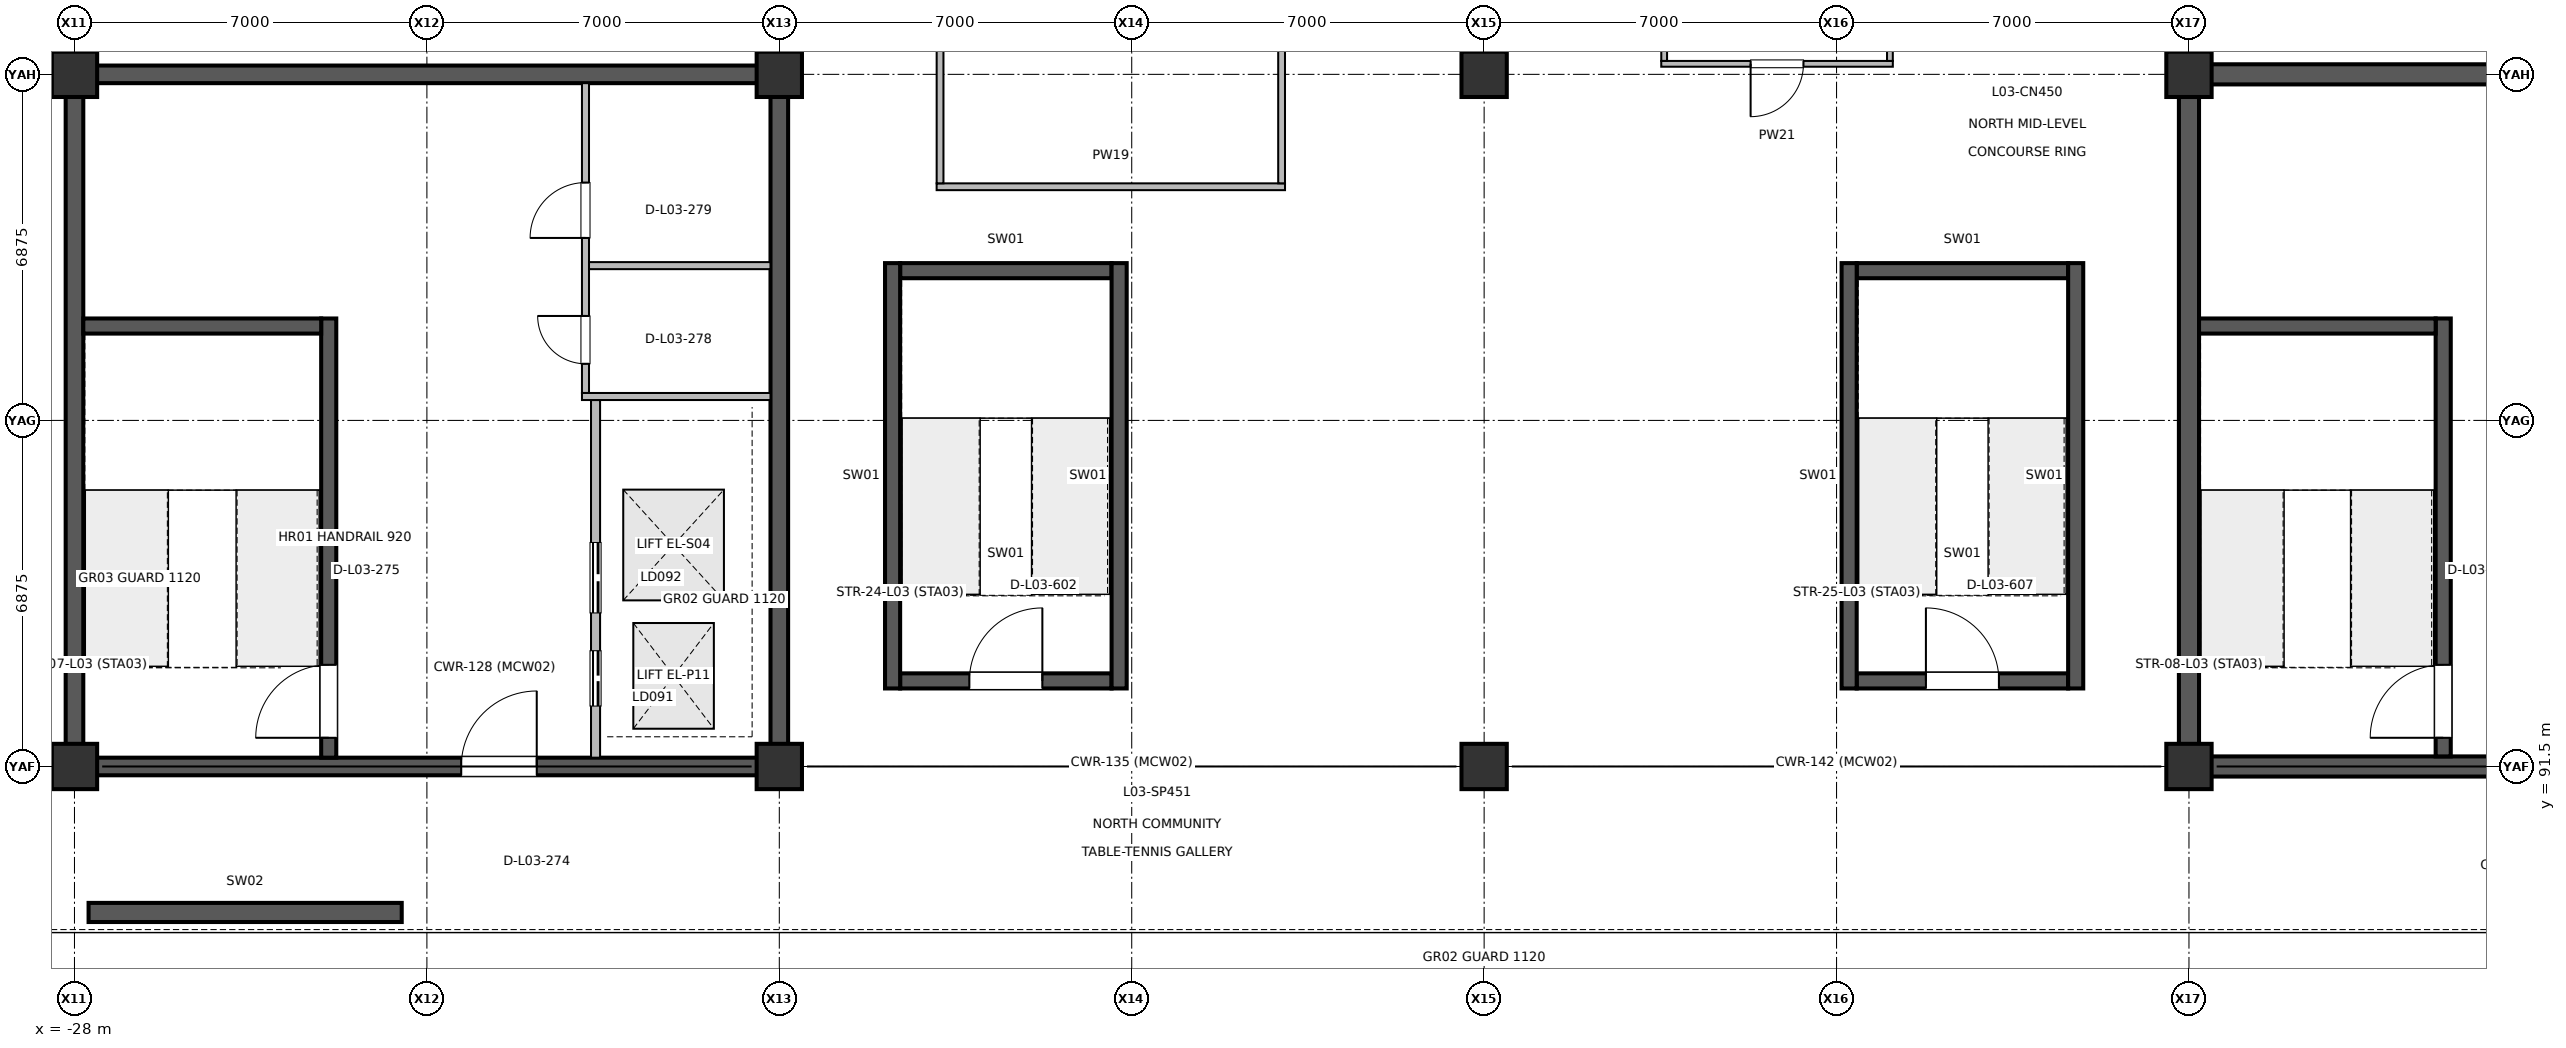
"""IFC4 building model, lengths in metres.
Left out: names, types, materials, properties, quantities, classifications, styles, units other than length and angle.
Written with IfcOpenShell. Run it as: python <this file> out.ifc"""

import sys

from ifc_helpers import new_model, si_unit, direction, frame, frame_2d, origin, origin_2d, place, context, subcontext, project, spatial, rectangle, circle, extrude, element, fill, save


model = new_model("IFC4")
c1 = context("Model", 3, precision=1e-05, world=origin(), true_north=direction((0.0, 1.0)))
c2 = subcontext(c1, "Body", "Model", "MODEL_VIEW")
j1 = project(units=[si_unit("LENGTHUNIT", "METRE"), si_unit("PLANEANGLEUNIT", "RADIAN")], contexts=[c1])
p1 = place(None, origin())
s1 = spatial("IfcSite", under=j1, at=p1, CompositionType="ELEMENT")
p2 = place(p1, origin())
s2 = spatial("IfcBuilding", under=s1, at=p2, CompositionType="ELEMENT")
p3 = place(p2, frame((0.0, 0.0, 11.4)))
s3 = spatial("IfcBuildingStorey", under=s2, at=p3, CompositionType="ELEMENT", Elevation=11.4)
for number, where, z_axis, x_axis in (
    (1, (-28.0, 91.5, 0.0), (0.0, 0.0, 1.0), (1.0, 0.0, 0.0)),
    (2, (-28.0, 105.25, 0.0), (0.0, 0.0, 1.0), (1.0, 0.0, 0.0)),
    (3, (-14.0, 91.5, 0.0), (0.0, 0.0, 1.0), (1.0, 0.0, 0.0)),
    (4, (-14.0, 105.25, 0.0), (0.0, 0.0, 1.0), (1.0, 0.0, 0.0)),
    (5, (0.0, 91.5, 0.0), (0.0, 0.0, 1.0), (1.0, 0.0, 0.0)),
    (6, (0.0, 105.25, 0.0), (0.0, 0.0, 1.0), (1.0, 0.0, 0.0)),
    (7, (14.0, 91.5, 0.0), (0.0, 0.0, 1.0), (1.0, 0.0, 0.0)),
    (8, (14.0, 105.25, 0.0), (0.0, 0.0, 1.0), (1.0, 0.0, 0.0)),
):
    element("IfcColumn", number, at=place(p3, frame(where, z_axis=z_axis, x_axis=x_axis)), inside=s3, PredefinedType="COLUMN", context=c2, shape_type="SweptSolid", body=[
        extrude(circle(Radius=0.45, at=origin_2d()), origin(), (0.0, 0.0, 1.0), 4.798),
    ])
for number, where, z_axis, x_axis in (
    (9, (-28.0, 91.675, 0.0), (0.0, 0.0, 1.0), (0.0, 1.0, 0.0)),
    (10, (-14.0, 91.675, 0.0), (0.0, 0.0, 1.0), (0.0, 1.0, 0.0)),
):
    element("IfcWall", number, at=place(p3, frame(where, z_axis=z_axis, x_axis=x_axis)), inside=s3, PredefinedType="SHEAR", context=c2, shape_type="SweptSolid", body=[
        extrude(rectangle(XDim=13.4, YDim=0.35, at=frame_2d((6.7, 0.0))), origin(), (0.0, 0.0, 1.0), 4.6),
    ])
p4 = place(p3, frame((-27.825, 91.5, 0.0), z_axis=(0.0, 0.0, 1.0), x_axis=(1.0, 0.0, 0.0)))
e11 = element("IfcWall", 11, at=p4, inside=s3, PredefinedType="SHEAR", context=c2, shape_type="SweptSolid", body=[
    extrude(rectangle(XDim=13.65, YDim=0.35, at=frame_2d((6.825, 0.0))), origin(), (0.0, 0.0, 1.0), 4.6),
])
p5 = place(p4, frame((7.507, 0.0, 0.0)))
e12 = element("IfcOpeningElement", 12, at=p5, cuts=e11, PredefinedType="OPENING", context=c2, shape_type="SweptSolid", body=[
    extrude(rectangle(XDim=1.5, YDim=2.2, at=frame_2d((0.75, 1.1))), frame((0.0, 0.185, 0.0), z_axis=(0.0, -1.0, 0.0), x_axis=(1.0, 0.0, 0.0)), (0.0, 0.0, 1.0), 0.37),
])
p6 = place(p3, frame((-27.825, 105.25, 0.0), z_axis=(0.0, 0.0, 1.0), x_axis=(1.0, 0.0, 0.0)))
e13 = element("IfcWall", 13, at=p6, inside=s3, PredefinedType="SHEAR", context=c2, shape_type="SweptSolid", body=[
    extrude(rectangle(XDim=13.65, YDim=0.35, at=frame_2d((6.825, 0.0))), origin(), (0.0, 0.0, 1.0), 4.6),
])
p7 = place(p3, frame((14.0, 91.7, 0.0), z_axis=(0.0, 0.0, 1.0), x_axis=(0.0, 1.0, 0.0)))
e14 = element("IfcWall", 14, at=p7, inside=s3, PredefinedType="SHEAR", context=c2, shape_type="SweptSolid", body=[
    extrude(rectangle(XDim=13.35, YDim=0.4, at=frame_2d((6.675, 0.0))), origin(), (0.0, 0.0, 1.0), 4.6),
])
p8 = place(p3, frame((14.2, 91.5, 0.0), z_axis=(0.0, 0.0, 1.0), x_axis=(1.0, 0.0, 0.0)))
e15 = element("IfcWall", 15, at=p8, inside=s3, PredefinedType="SHEAR", context=c2, shape_type="SweptSolid", body=[
    extrude(rectangle(XDim=13.6, YDim=0.4, at=frame_2d((6.8, 0.0))), origin(), (0.0, 0.0, 1.0), 4.6),
])
p9 = place(p8, frame((7.48, 0.0, 0.0)))
e16 = element("IfcOpeningElement", 16, at=p9, cuts=e15, PredefinedType="OPENING", context=c2, shape_type="SweptSolid", body=[
    extrude(rectangle(XDim=1.5, YDim=2.2, at=frame_2d((0.75, 1.1))), frame((0.0, 0.21, 0.0), z_axis=(0.0, -1.0, 0.0), x_axis=(1.0, 0.0, 0.0)), (0.0, 0.0, 1.0), 0.42),
])
p10 = place(p3, frame((14.2, 105.25, 0.0), z_axis=(0.0, 0.0, 1.0), x_axis=(1.0, 0.0, 0.0)))
e17 = element("IfcWall", 17, at=p10, inside=s3, PredefinedType="SHEAR", context=c2, shape_type="SweptSolid", body=[
    extrude(rectangle(XDim=13.6, YDim=0.4, at=frame_2d((6.8, 0.0))), origin(), (0.0, 0.0, 1.0), 4.6),
])
p11 = place(p3, frame((-27.72, 88.6, 0.0), z_axis=(0.0, 0.0, 1.0), x_axis=(1.0, 0.0, 0.0)))
e18 = element("IfcWall", 18, at=p11, inside=s3, PredefinedType="SHEAR", context=c2, shape_type="SweptSolid", body=[
    extrude(rectangle(XDim=6.22, YDim=0.38, at=frame_2d((3.11, 0.0))), origin(), (0.0, 0.0, 1.0), 4.6),
])
p12 = place(p3, frame((-22.95, 91.675, 0.0), z_axis=(0.0, 0.0, 1.0), x_axis=(0.0, 1.0, 0.0)))
e19 = element("IfcWall", 19, at=p12, inside=s3, PredefinedType="SHEAR", context=c2, shape_type="SweptSolid", body=[
    extrude(rectangle(XDim=8.725, YDim=0.3, at=frame_2d((4.362, 0.0))), origin(), (0.0, 0.0, 1.0), 4.6),
])
p13 = place(p12, frame((0.395, 0.0, 0.0)))
e20 = element("IfcOpeningElement", 20, at=p13, cuts=e19, PredefinedType="OPENING", context=c2, shape_type="SweptSolid", body=[
    extrude(rectangle(XDim=1.45, YDim=2.2, at=frame_2d((0.725, 1.1))), frame((0.0, 0.16, 0.0), z_axis=(0.0, -1.0, 0.0), x_axis=(1.0, 0.0, 0.0)), (0.0, 0.0, 1.0), 0.32),
])
p14 = place(p3, frame((-17.65, 91.675, 0.0), z_axis=(0.0, 0.0, 1.0), x_axis=(0.0, 1.0, 0.0)))
e21 = element("IfcWall", 21, at=p14, inside=s3, PredefinedType="PARTITIONING", context=c2, shape_type="SweptSolid", body=[
    extrude(rectangle(XDim=7.105, YDim=0.18, at=frame_2d((3.552, 0.0))), origin(), (0.0, 0.0, 1.0), 3.82),
])
p15 = place(p14, frame((1.025, 0.0, 0.0)))
e22 = element("IfcOpeningElement", 22, at=p15, cuts=e21, PredefinedType="OPENING", context=c2, shape_type="SweptSolid", body=[
    extrude(rectangle(XDim=1.1, YDim=2.2, at=frame_2d((0.55, 1.1))), frame((0.0, 0.1, 0.0), z_axis=(0.0, -1.0, 0.0), x_axis=(1.0, 0.0, 0.0)), (0.0, 0.0, 1.0), 0.2),
])
p16 = place(p14, frame((2.875, 0.0, 0.0)))
e23 = element("IfcOpeningElement", 23, at=p16, cuts=e21, PredefinedType="OPENING", context=c2, shape_type="SweptSolid", body=[
    extrude(rectangle(XDim=1.4, YDim=2.3, at=frame_2d((0.7, 1.15))), frame((0.0, 0.1, 0.0), z_axis=(0.0, -1.0, 0.0), x_axis=(1.0, 0.0, 0.0)), (0.0, 0.0, 1.0), 0.2),
])
p17 = place(p3, frame((-17.85, 98.92, 0.0), z_axis=(0.0, 0.0, 1.0), x_axis=(0.0, 1.0, 0.0)))
e24 = element("IfcWall", 24, at=p17, inside=s3, PredefinedType="PARTITIONING", context=c2, shape_type="SweptSolid", body=[
    extrude(rectangle(XDim=6.155, YDim=0.14, at=frame_2d((3.078, 0.0))), origin(), (0.0, 0.0, 1.0), 3.82),
])
p18 = place(p17, frame((0.58, 0.0, 0.0)))
e25 = element("IfcOpeningElement", 25, at=p18, cuts=e24, PredefinedType="OPENING", context=c2, shape_type="SweptSolid", body=[
    extrude(rectangle(XDim=0.95, YDim=2.15, at=frame_2d((0.475, 1.075))), frame((0.0, 0.08, 0.0), z_axis=(0.0, -1.0, 0.0), x_axis=(1.0, 0.0, 0.0)), (0.0, 0.0, 1.0), 0.16),
])
p19 = place(p17, frame((3.08, 0.0, 0.0)))
e26 = element("IfcOpeningElement", 26, at=p19, cuts=e24, PredefinedType="OPENING", context=c2, shape_type="SweptSolid", body=[
    extrude(rectangle(XDim=1.1, YDim=2.15, at=frame_2d((0.55, 1.075))), frame((0.0, 0.08, 0.0), z_axis=(0.0, -1.0, 0.0), x_axis=(1.0, 0.0, 0.0)), (0.0, 0.0, 1.0), 0.16),
])
p20 = place(p3, frame((19.05, 91.7, 0.0), z_axis=(0.0, 0.0, 1.0), x_axis=(0.0, 1.0, 0.0)))
e27 = element("IfcWall", 27, at=p20, inside=s3, PredefinedType="SHEAR", context=c2, shape_type="SweptSolid", body=[
    extrude(rectangle(XDim=8.7, YDim=0.3, at=frame_2d((4.35, 0.0))), origin(), (0.0, 0.0, 1.0), 4.6),
])
p21 = place(p20, frame((0.37, 0.0, 0.0)))
e28 = element("IfcOpeningElement", 28, at=p21, cuts=e27, PredefinedType="OPENING", context=c2, shape_type="SweptSolid", body=[
    extrude(rectangle(XDim=1.45, YDim=2.2, at=frame_2d((0.725, 1.1))), frame((0.0, 0.16, 0.0), z_axis=(0.0, -1.0, 0.0), x_axis=(1.0, 0.0, 0.0)), (0.0, 0.0, 1.0), 0.32),
])
p22 = place(p3, frame((8.118, 105.459, 0.0), z_axis=(0.0, 0.0, 1.0), x_axis=(-1.0, 0.0, 0.0)))
e29 = element("IfcWall", 29, at=p22, inside=s3, PredefinedType="PARTITIONING", context=c2, shape_type="SweptSolid", body=[
    extrude(rectangle(XDim=4.6, YDim=0.115, at=frame_2d((2.3, 0.0))), origin(), (0.0, 0.0, 1.0), 3.475),
])
p23 = place(p22, frame((1.775, 0.0, 0.0)))
e30 = element("IfcOpeningElement", 30, at=p23, cuts=e29, PredefinedType="OPENING", context=c2, shape_type="SweptSolid", body=[
    extrude(rectangle(XDim=1.05, YDim=2.25, at=frame_2d((0.525, 1.125))), frame((0.0, 0.067, 0.0), z_axis=(0.0, -1.0, 0.0), x_axis=(1.0, 0.0, 0.0)), (0.0, 0.0, 1.0), 0.135),
])
p24 = place(p3, frame((-17.92, 98.85, 0.0), z_axis=(0.0, 0.0, 1.0), x_axis=(1.0, 0.0, 0.0)))
e31 = element("IfcWall", 31, at=p24, inside=s3, PredefinedType="PARTITIONING", context=c2, shape_type="SweptSolid", body=[
    extrude(rectangle(XDim=3.745, YDim=0.14, at=frame_2d((1.873, 0.0))), origin(), (0.0, 0.0, 1.0), 3.82),
])
p25 = place(p3, frame((-17.78, 101.45, 0.0), z_axis=(0.0, 0.0, 1.0), x_axis=(1.0, 0.0, 0.0)))
e32 = element("IfcWall", 32, at=p25, inside=s3, PredefinedType="PARTITIONING", context=c2, shape_type="SweptSolid", body=[
    extrude(rectangle(XDim=3.605, YDim=0.14, at=frame_2d((1.802, 0.0))), origin(), (0.0, 0.0, 1.0), 3.82),
])
p26 = place(p3, frame((-10.875, 103.017, 0.0), z_axis=(0.0, 0.0, 1.0), x_axis=(1.0, 0.0, 0.0)))
e33 = element("IfcWall", 33, at=p26, inside=s3, PredefinedType="PARTITIONING", context=c2, shape_type="SweptSolid", body=[
    extrude(rectangle(XDim=6.92, YDim=0.135, at=frame_2d((3.46, 0.0))), origin(), (0.0, 0.0, 1.0), 3.82),
])
for number, where, z_axis, x_axis in (
    (34, (-10.807, 103.085, 0.0), (0.0, 0.0, 1.0), (0.0, 1.0, 0.0)),
    (35, (-4.023, 103.085, 0.0), (0.0, 0.0, 1.0), (0.0, 1.0, 0.0)),
):
    element("IfcWall", number, at=place(p3, frame(where, z_axis=z_axis, x_axis=x_axis)), inside=s3, PredefinedType="PARTITIONING", context=c2, shape_type="SweptSolid", body=[
        extrude(rectangle(XDim=3.064, YDim=0.135, at=frame_2d((1.532, 0.0))), origin(), (0.0, 0.0, 1.0), 3.475),
    ])
for number, where, z_axis, x_axis in (
    (36, (3.576, 105.517, 0.0), (0.0, 0.0, 1.0), (0.0, 1.0, 0.0)),
    (37, (8.06, 105.517, 0.0), (0.0, 0.0, 1.0), (0.0, 1.0, 0.0)),
):
    element("IfcWall", number, at=place(p3, frame(where, z_axis=z_axis, x_axis=x_axis)), inside=s3, PredefinedType="PARTITIONING", context=c2, shape_type="SweptSolid", body=[
        extrude(rectangle(XDim=2.244, YDim=0.115, at=frame_2d((1.122, 0.0))), origin(), (0.0, 0.0, 1.0), 3.475),
    ])
p27 = place(p3, frame((-27.825, 100.25, 0.0), z_axis=(0.0, 0.0, 1.0), x_axis=(1.0, 0.0, 0.0)))
e38 = element("IfcWall", 38, at=p27, inside=s3, PredefinedType="SHEAR", context=c2, shape_type="SweptSolid", body=[
    extrude(rectangle(XDim=4.725, YDim=0.3, at=frame_2d((2.362, 0.0))), origin(), (0.0, 0.0, 1.0), 4.6),
])
p28 = place(p3, frame((14.2, 100.25, 0.0), z_axis=(0.0, 0.0, 1.0), x_axis=(1.0, 0.0, 0.0)))
e39 = element("IfcWall", 39, at=p28, inside=s3, PredefinedType="SHEAR", context=c2, shape_type="SweptSolid", body=[
    extrude(rectangle(XDim=4.7, YDim=0.3, at=frame_2d((2.35, 0.0))), origin(), (0.0, 0.0, 1.0), 4.6),
])
p29 = place(p3, frame((-11.6, 93.2, 0.0), z_axis=(0.0, 0.0, 1.0), x_axis=(1.0, 0.0, 0.0)))
e40 = element("IfcWall", 40, at=p29, inside=s3, PredefinedType="SHEAR", context=c2, shape_type="SweptSolid", body=[
    extrude(rectangle(XDim=4.2, YDim=0.3, at=frame_2d((2.1, 0.0))), origin(), (0.0, 0.0, 1.0), 4.6),
])
p30 = place(p29, frame((1.375, 0.0, 0.0)))
e41 = element("IfcOpeningElement", 41, at=p30, cuts=e40, PredefinedType="OPENING", context=c2, shape_type="SweptSolid", body=[
    extrude(rectangle(XDim=1.45, YDim=2.2, at=frame_2d((0.725, 1.1))), frame((0.0, 0.16, 0.0), z_axis=(0.0, -1.0, 0.0), x_axis=(1.0, 0.0, 0.0)), (0.0, 0.0, 1.0), 0.32),
])
p31 = place(p3, frame((-11.6, 101.35, 0.0), z_axis=(0.0, 0.0, 1.0), x_axis=(1.0, 0.0, 0.0)))
e42 = element("IfcWall", 42, at=p31, inside=s3, PredefinedType="SHEAR", context=c2, shape_type="SweptSolid", body=[
    extrude(rectangle(XDim=4.2, YDim=0.3, at=frame_2d((2.1, 0.0))), origin(), (0.0, 0.0, 1.0), 4.6),
])
for number, where, z_axis, x_axis in (
    (43, (-11.75, 93.05, 0.0), (0.0, 0.0, 1.0), (0.0, 1.0, 0.0)),
    (44, (-7.25, 93.05, 0.0), (0.0, 0.0, 1.0), (0.0, 1.0, 0.0)),
):
    element("IfcWall", number, at=place(p3, frame(where, z_axis=z_axis, x_axis=x_axis)), inside=s3, PredefinedType="SHEAR", context=c2, shape_type="SweptSolid", body=[
        extrude(rectangle(XDim=8.45, YDim=0.3, at=frame_2d((4.225, 0.0))), origin(), (0.0, 0.0, 1.0), 4.6),
    ])
p32 = place(p3, frame((7.4, 93.2, 0.0), z_axis=(0.0, 0.0, 1.0), x_axis=(1.0, 0.0, 0.0)))
e45 = element("IfcWall", 45, at=p32, inside=s3, PredefinedType="SHEAR", context=c2, shape_type="SweptSolid", body=[
    extrude(rectangle(XDim=4.2, YDim=0.3, at=frame_2d((2.1, 0.0))), origin(), (0.0, 0.0, 1.0), 4.6),
])
p33 = place(p32, frame((1.375, 0.0, 0.0)))
e46 = element("IfcOpeningElement", 46, at=p33, cuts=e45, PredefinedType="OPENING", context=c2, shape_type="SweptSolid", body=[
    extrude(rectangle(XDim=1.45, YDim=2.2, at=frame_2d((0.725, 1.1))), frame((0.0, 0.16, 0.0), z_axis=(0.0, -1.0, 0.0), x_axis=(1.0, 0.0, 0.0)), (0.0, 0.0, 1.0), 0.32),
])
p34 = place(p3, frame((7.4, 101.35, 0.0), z_axis=(0.0, 0.0, 1.0), x_axis=(1.0, 0.0, 0.0)))
e47 = element("IfcWall", 47, at=p34, inside=s3, PredefinedType="SHEAR", context=c2, shape_type="SweptSolid", body=[
    extrude(rectangle(XDim=4.2, YDim=0.3, at=frame_2d((2.1, 0.0))), origin(), (0.0, 0.0, 1.0), 4.6),
])
for number, where, z_axis, x_axis in (
    (48, (7.25, 93.05, 0.0), (0.0, 0.0, 1.0), (0.0, 1.0, 0.0)),
    (49, (11.75, 93.05, 0.0), (0.0, 0.0, 1.0), (0.0, 1.0, 0.0)),
):
    element("IfcWall", number, at=place(p3, frame(where, z_axis=z_axis, x_axis=x_axis)), inside=s3, PredefinedType="SHEAR", context=c2, shape_type="SweptSolid", body=[
        extrude(rectangle(XDim=8.45, YDim=0.3, at=frame_2d((4.225, 0.0))), origin(), (0.0, 0.0, 1.0), 4.6),
    ])
p35 = place(p5, origin())
e50 = element("IfcDoor", 50, at=p35, inside=s3, OperationType="SINGLE_SWING_RIGHT", PredefinedType="DOOR", context=c2, shape_type="SweptSolid", body=[
    extrude(rectangle(XDim=1.5, YDim=2.2, at=frame_2d((0.75, 1.1))), frame((0.0, 0.025, 0.0), z_axis=(0.0, -1.0, 0.0), x_axis=(1.0, 0.0, 0.0)), (0.0, 0.0, 1.0), 0.05),
])
fill(e12, e50)
p36 = place(p13, origin())
e51 = element("IfcDoor", 51, at=p36, inside=s3, OperationType="SINGLE_SWING_LEFT", PredefinedType="DOOR", context=c2, shape_type="SweptSolid", body=[
    extrude(rectangle(XDim=1.45, YDim=2.2, at=frame_2d((0.725, 1.1))), frame((0.0, 0.025, 0.0), z_axis=(0.0, -1.0, 0.0), x_axis=(1.0, 0.0, 0.0)), (0.0, 0.0, 1.0), 0.05),
])
fill(e20, e51)
p37 = place(p15, origin())
e52 = element("IfcDoor", 52, at=p37, inside=s3, OperationType="DOUBLE_DOOR_SLIDING", PredefinedType="DOOR", context=c2, shape_type="SweptSolid", body=[
    extrude(rectangle(XDim=1.1, YDim=2.2, at=frame_2d((0.55, 1.1))), frame((0.0, 0.025, 0.0), z_axis=(0.0, -1.0, 0.0), x_axis=(1.0, 0.0, 0.0)), (0.0, 0.0, 1.0), 0.05),
])
fill(e22, e52)
p38 = place(p16, origin())
e53 = element("IfcDoor", 53, at=p38, inside=s3, OperationType="DOUBLE_DOOR_SLIDING", PredefinedType="DOOR", context=c2, shape_type="SweptSolid", body=[
    extrude(rectangle(XDim=1.4, YDim=2.3, at=frame_2d((0.7, 1.15))), frame((0.0, 0.025, 0.0), z_axis=(0.0, -1.0, 0.0), x_axis=(1.0, 0.0, 0.0)), (0.0, 0.0, 1.0), 0.05),
])
fill(e23, e53)
p39 = place(p18, origin())
e54 = element("IfcDoor", 54, at=p39, inside=s3, OperationType="SINGLE_SWING_RIGHT", PredefinedType="DOOR", context=c2, shape_type="SweptSolid", body=[
    extrude(rectangle(XDim=0.95, YDim=2.15, at=frame_2d((0.475, 1.075))), frame((0.0, 0.025, 0.0), z_axis=(0.0, -1.0, 0.0), x_axis=(1.0, 0.0, 0.0)), (0.0, 0.0, 1.0), 0.05),
])
fill(e25, e54)
p40 = place(p19, origin())
e55 = element("IfcDoor", 55, at=p40, inside=s3, OperationType="SINGLE_SWING_LEFT", PredefinedType="DOOR", context=c2, shape_type="SweptSolid", body=[
    extrude(rectangle(XDim=1.1, YDim=2.15, at=frame_2d((0.55, 1.075))), frame((0.0, 0.025, 0.0), z_axis=(0.0, -1.0, 0.0), x_axis=(1.0, 0.0, 0.0)), (0.0, 0.0, 1.0), 0.05),
])
fill(e26, e55)
p41 = place(p21, origin())
e56 = element("IfcDoor", 56, at=p41, inside=s3, OperationType="SINGLE_SWING_LEFT", PredefinedType="DOOR", context=c2, shape_type="SweptSolid", body=[
    extrude(rectangle(XDim=1.45, YDim=2.2, at=frame_2d((0.725, 1.1))), frame((0.0, 0.025, 0.0), z_axis=(0.0, -1.0, 0.0), x_axis=(1.0, 0.0, 0.0)), (0.0, 0.0, 1.0), 0.05),
])
fill(e28, e56)
p42 = place(p23, origin())
e57 = element("IfcDoor", 57, at=p42, inside=s3, OperationType="SINGLE_SWING_RIGHT", PredefinedType="DOOR", context=c2, shape_type="SweptSolid", body=[
    extrude(rectangle(XDim=1.05, YDim=2.25, at=frame_2d((0.525, 1.125))), frame((0.0, 0.025, 0.0), z_axis=(0.0, -1.0, 0.0), x_axis=(1.0, 0.0, 0.0)), (0.0, 0.0, 1.0), 0.05),
])
fill(e30, e57)
p43 = place(p30, origin())
e58 = element("IfcDoor", 58, at=p43, inside=s3, OperationType="SINGLE_SWING_RIGHT", PredefinedType="DOOR", context=c2, shape_type="SweptSolid", body=[
    extrude(rectangle(XDim=1.45, YDim=2.2, at=frame_2d((0.725, 1.1))), frame((0.0, 0.025, 0.0), z_axis=(0.0, -1.0, 0.0), x_axis=(1.0, 0.0, 0.0)), (0.0, 0.0, 1.0), 0.05),
])
fill(e41, e58)
p44 = place(p33, origin())
e59 = element("IfcDoor", 59, at=p44, inside=s3, OperationType="SINGLE_SWING_LEFT", PredefinedType="DOOR", context=c2, shape_type="SweptSolid", body=[
    extrude(rectangle(XDim=1.45, YDim=2.2, at=frame_2d((0.725, 1.1))), frame((0.0, 0.025, 0.0), z_axis=(0.0, -1.0, 0.0), x_axis=(1.0, 0.0, 0.0)), (0.0, 0.0, 1.0), 0.05),
])
fill(e46, e59)
save(model, sys.argv[1])
